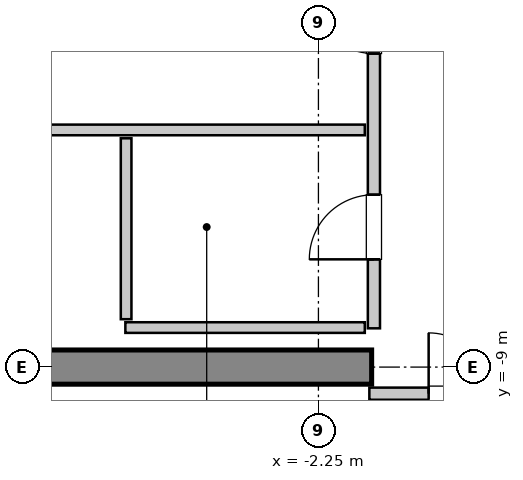
"""IFC4 building model, lengths in metres.
Left out: names, types, materials, properties, quantities, classifications, styles, units other than length and angle.
Written with IfcOpenShell. Run it as: python <this file> out.ifc"""

import sys

from ifc_helpers import new_model, si_unit, direction, frame, frame_2d, origin, place, context, subcontext, project, spatial, rectangle, extrude, source, transform, mapped, element, fill, save


model = new_model("IFC4")
c1 = context("Model", 3, precision=1e-05, world=origin(), true_north=direction((0.0, 1.0)))
c2 = subcontext(c1, "Body", "Model", "MODEL_VIEW")
j1 = project(units=[si_unit("LENGTHUNIT", "METRE"), si_unit("PLANEANGLEUNIT", "RADIAN")], contexts=[c1])
p1 = place(None, origin())
s1 = spatial("IfcSite", under=j1, at=p1, CompositionType="ELEMENT")
p2 = place(p1, origin())
s2 = spatial("IfcBuilding", under=s1, at=p2, CompositionType="ELEMENT")
p3 = place(p2, frame((0.0, 0.0, 276.0)))
s3 = spatial("IfcBuildingStorey", under=s2, at=p3, CompositionType="ELEMENT", Elevation=276.0)
m1 = source(origin(), c2, "Body", "SweptSolid", [
    extrude(rectangle(XDim=9.925, YDim=0.45, at=frame_2d((4.962, 0.0))), origin(), (0.0, 0.0, 1.0), 3.8),
])
p4 = place(p3, frame((-11.475, -9.0, 0.0), z_axis=(0.0, 0.0, 1.0), x_axis=(1.0, 0.0, 0.0)))
e1 = element("IfcWall", 1, at=p4, inside=s3, PredefinedType="SHEAR", context=c2, shape_type="MappedRepresentation", body=[
    mapped(m1, transform((0.0, 0.0, 0.0), x_axis=(1.0, 0.0, 0.0), y_axis=(0.0, 1.0, 0.0), z_axis=(0.0, 0.0, 1.0), scale=1.0)),
])
m2 = source(origin(), c2, "Body", "SweptSolid", [
    extrude(rectangle(XDim=3.16, YDim=0.16, at=frame_2d((1.58, 0.0))), origin(), (0.0, 0.0, 1.0), 2.625),
])
p5 = place(p3, frame((-1.58, -9.35, 0.0), z_axis=(0.0, 0.0, 1.0), x_axis=(1.0, 0.0, 0.0)))
e2 = element("IfcWall", 2, at=p5, inside=s3, PredefinedType="PARTITIONING", context=c2, shape_type="MappedRepresentation", body=[
    mapped(m2, transform((0.0, 0.0, 0.0), x_axis=(1.0, 0.0, 0.0), y_axis=(0.0, 1.0, 0.0), z_axis=(0.0, 0.0, 1.0), scale=1.0)),
])
p6 = place(p5, frame((0.78, 0.0, 0.0)))
e3 = element("IfcOpeningElement", 3, at=p6, cuts=e2, PredefinedType="OPENING", context=c2, shape_type="SweptSolid", body=[
    extrude(rectangle(XDim=1.6, YDim=2.3, at=frame_2d((0.8, 1.15))), frame((0.0, 0.09, 0.0), z_axis=(0.0, -1.0, 0.0), x_axis=(1.0, 0.0, 0.0)), (0.0, 0.0, 1.0), 0.18),
])
m3 = source(origin(), c2, "Body", "SweptSolid", [
    extrude(rectangle(XDim=5.48, YDim=0.16, at=frame_2d((2.74, 0.0))), origin(), (0.0, 0.0, 1.0), 3.535),
])
p7 = place(p3, frame((-1.52, -8.49, 0.0), z_axis=(0.0, 0.0, 1.0), x_axis=(0.0, 1.0, 0.0)))
e4 = element("IfcWall", 4, at=p7, inside=s3, PredefinedType="PARTITIONING", context=c2, shape_type="MappedRepresentation", body=[
    mapped(m3, transform((0.0, 0.0, 0.0), x_axis=(1.0, 0.0, 0.0), y_axis=(0.0, 1.0, 0.0), z_axis=(0.0, 0.0, 1.0), scale=1.0)),
])
p8 = place(p7, frame((0.907, 0.0, 0.0)))
e5 = element("IfcOpeningElement", 5, at=p8, cuts=e4, PredefinedType="OPENING", context=c2, shape_type="SweptSolid", body=[
    extrude(rectangle(XDim=0.85, YDim=2.1, at=frame_2d((0.425, 1.05))), frame((0.0, 0.09, 0.0), z_axis=(0.0, -1.0, 0.0), x_axis=(1.0, 0.0, 0.0)), (0.0, 0.0, 1.0), 0.18),
])
p9 = place(p7, frame((3.615, 0.0, 0.0)))
e6 = element("IfcOpeningElement", 6, at=p9, cuts=e4, PredefinedType="OPENING", context=c2, shape_type="SweptSolid", body=[
    extrude(rectangle(XDim=0.85, YDim=2.1, at=frame_2d((0.425, 1.05))), frame((0.0, 0.09, 0.0), z_axis=(0.0, -1.0, 0.0), x_axis=(1.0, 0.0, 0.0)), (0.0, 0.0, 1.0), 0.18),
])
m4 = source(origin(), c2, "Body", "SweptSolid", [
    extrude(rectangle(XDim=5.55, YDim=0.14, at=frame_2d((2.775, 0.0))), origin(), (0.0, 0.0, 1.0), 3.535),
])
p10 = place(p3, frame((-7.19, -5.88, 0.0), z_axis=(0.0, 0.0, 1.0), x_axis=(1.0, 0.0, 0.0)))
e7 = element("IfcWall", 7, at=p10, inside=s3, PredefinedType="PARTITIONING", context=c2, shape_type="MappedRepresentation", body=[
    mapped(m4, transform((0.0, 0.0, 0.0), x_axis=(1.0, 0.0, 0.0), y_axis=(0.0, 1.0, 0.0), z_axis=(0.0, 0.0, 1.0), scale=1.0)),
])
m5 = source(origin(), c2, "Body", "SweptSolid", [
    extrude(rectangle(XDim=3.15, YDim=0.14, at=frame_2d((1.575, 0.0))), origin(), (0.0, 0.0, 1.0), 3.535),
])
p11 = place(p3, frame((-4.79, -8.48, 0.0), z_axis=(0.0, 0.0, 1.0), x_axis=(1.0, 0.0, 0.0)))
e8 = element("IfcWall", 8, at=p11, inside=s3, PredefinedType="PARTITIONING", context=c2, shape_type="MappedRepresentation", body=[
    mapped(m5, transform((0.0, 0.0, 0.0), x_axis=(1.0, 0.0, 0.0), y_axis=(0.0, 1.0, 0.0), z_axis=(0.0, 0.0, 1.0), scale=1.0)),
])
m6 = source(origin(), c2, "Body", "SweptSolid", [
    extrude(rectangle(XDim=2.38, YDim=0.14, at=frame_2d((1.19, 0.0))), origin(), (0.0, 0.0, 1.0), 3.535),
])
p12 = place(p3, frame((-4.78, -8.37, 0.0), z_axis=(0.0, 0.0, 1.0), x_axis=(0.0, 1.0, 0.0)))
e9 = element("IfcWall", 9, at=p12, inside=s3, PredefinedType="PARTITIONING", context=c2, shape_type="MappedRepresentation", body=[
    mapped(m6, transform((0.0, 0.0, 0.0), x_axis=(1.0, 0.0, 0.0), y_axis=(0.0, 1.0, 0.0), z_axis=(0.0, 0.0, 1.0), scale=1.0)),
])
m7 = source(origin(), c2, "Body", "SweptSolid", [
    extrude(rectangle(XDim=1.6, YDim=2.3, at=frame_2d((0.8, 1.15))), frame((0.0, 0.025, 0.0), z_axis=(0.0, -1.0, 0.0), x_axis=(1.0, 0.0, 0.0)), (0.0, 0.0, 1.0), 0.05),
])
p13 = place(p6, origin())
e10 = element("IfcDoor", 10, at=p13, inside=s3, OperationType="DOUBLE_DOOR_SINGLE_SWING", PredefinedType="DOOR", context=c2, shape_type="MappedRepresentation", body=[
    mapped(m7, transform((0.0, 0.0, 0.0), x_axis=(1.0, 0.0, 0.0), y_axis=(0.0, 1.0, 0.0), z_axis=(0.0, 0.0, 1.0), scale=1.0)),
])
fill(e3, e10)
m8 = source(origin(), c2, "Body", "SweptSolid", [
    extrude(rectangle(XDim=0.85, YDim=2.1, at=frame_2d((0.425, 1.05))), frame((0.0, 0.025, 0.0), z_axis=(0.0, -1.0, 0.0), x_axis=(1.0, 0.0, 0.0)), (0.0, 0.0, 1.0), 0.05),
])
p14 = place(p8, origin())
e11 = element("IfcDoor", 11, at=p14, inside=s3, OperationType="SINGLE_SWING_LEFT", PredefinedType="DOOR", context=c2, shape_type="MappedRepresentation", body=[
    mapped(m8, transform((0.0, 0.0, 0.0), x_axis=(1.0, 0.0, 0.0), y_axis=(0.0, 1.0, 0.0), z_axis=(0.0, 0.0, 1.0), scale=1.0)),
])
fill(e5, e11)
p15 = place(p9, origin())
e12 = element("IfcDoor", 12, at=p15, inside=s3, OperationType="SINGLE_SWING_RIGHT", PredefinedType="DOOR", context=c2, shape_type="MappedRepresentation", body=[
    mapped(m8, transform((0.0, 0.0, 0.0), x_axis=(1.0, 0.0, 0.0), y_axis=(0.0, 1.0, 0.0), z_axis=(0.0, 0.0, 1.0), scale=1.0)),
])
fill(e6, e12)
save(model, sys.argv[1])
